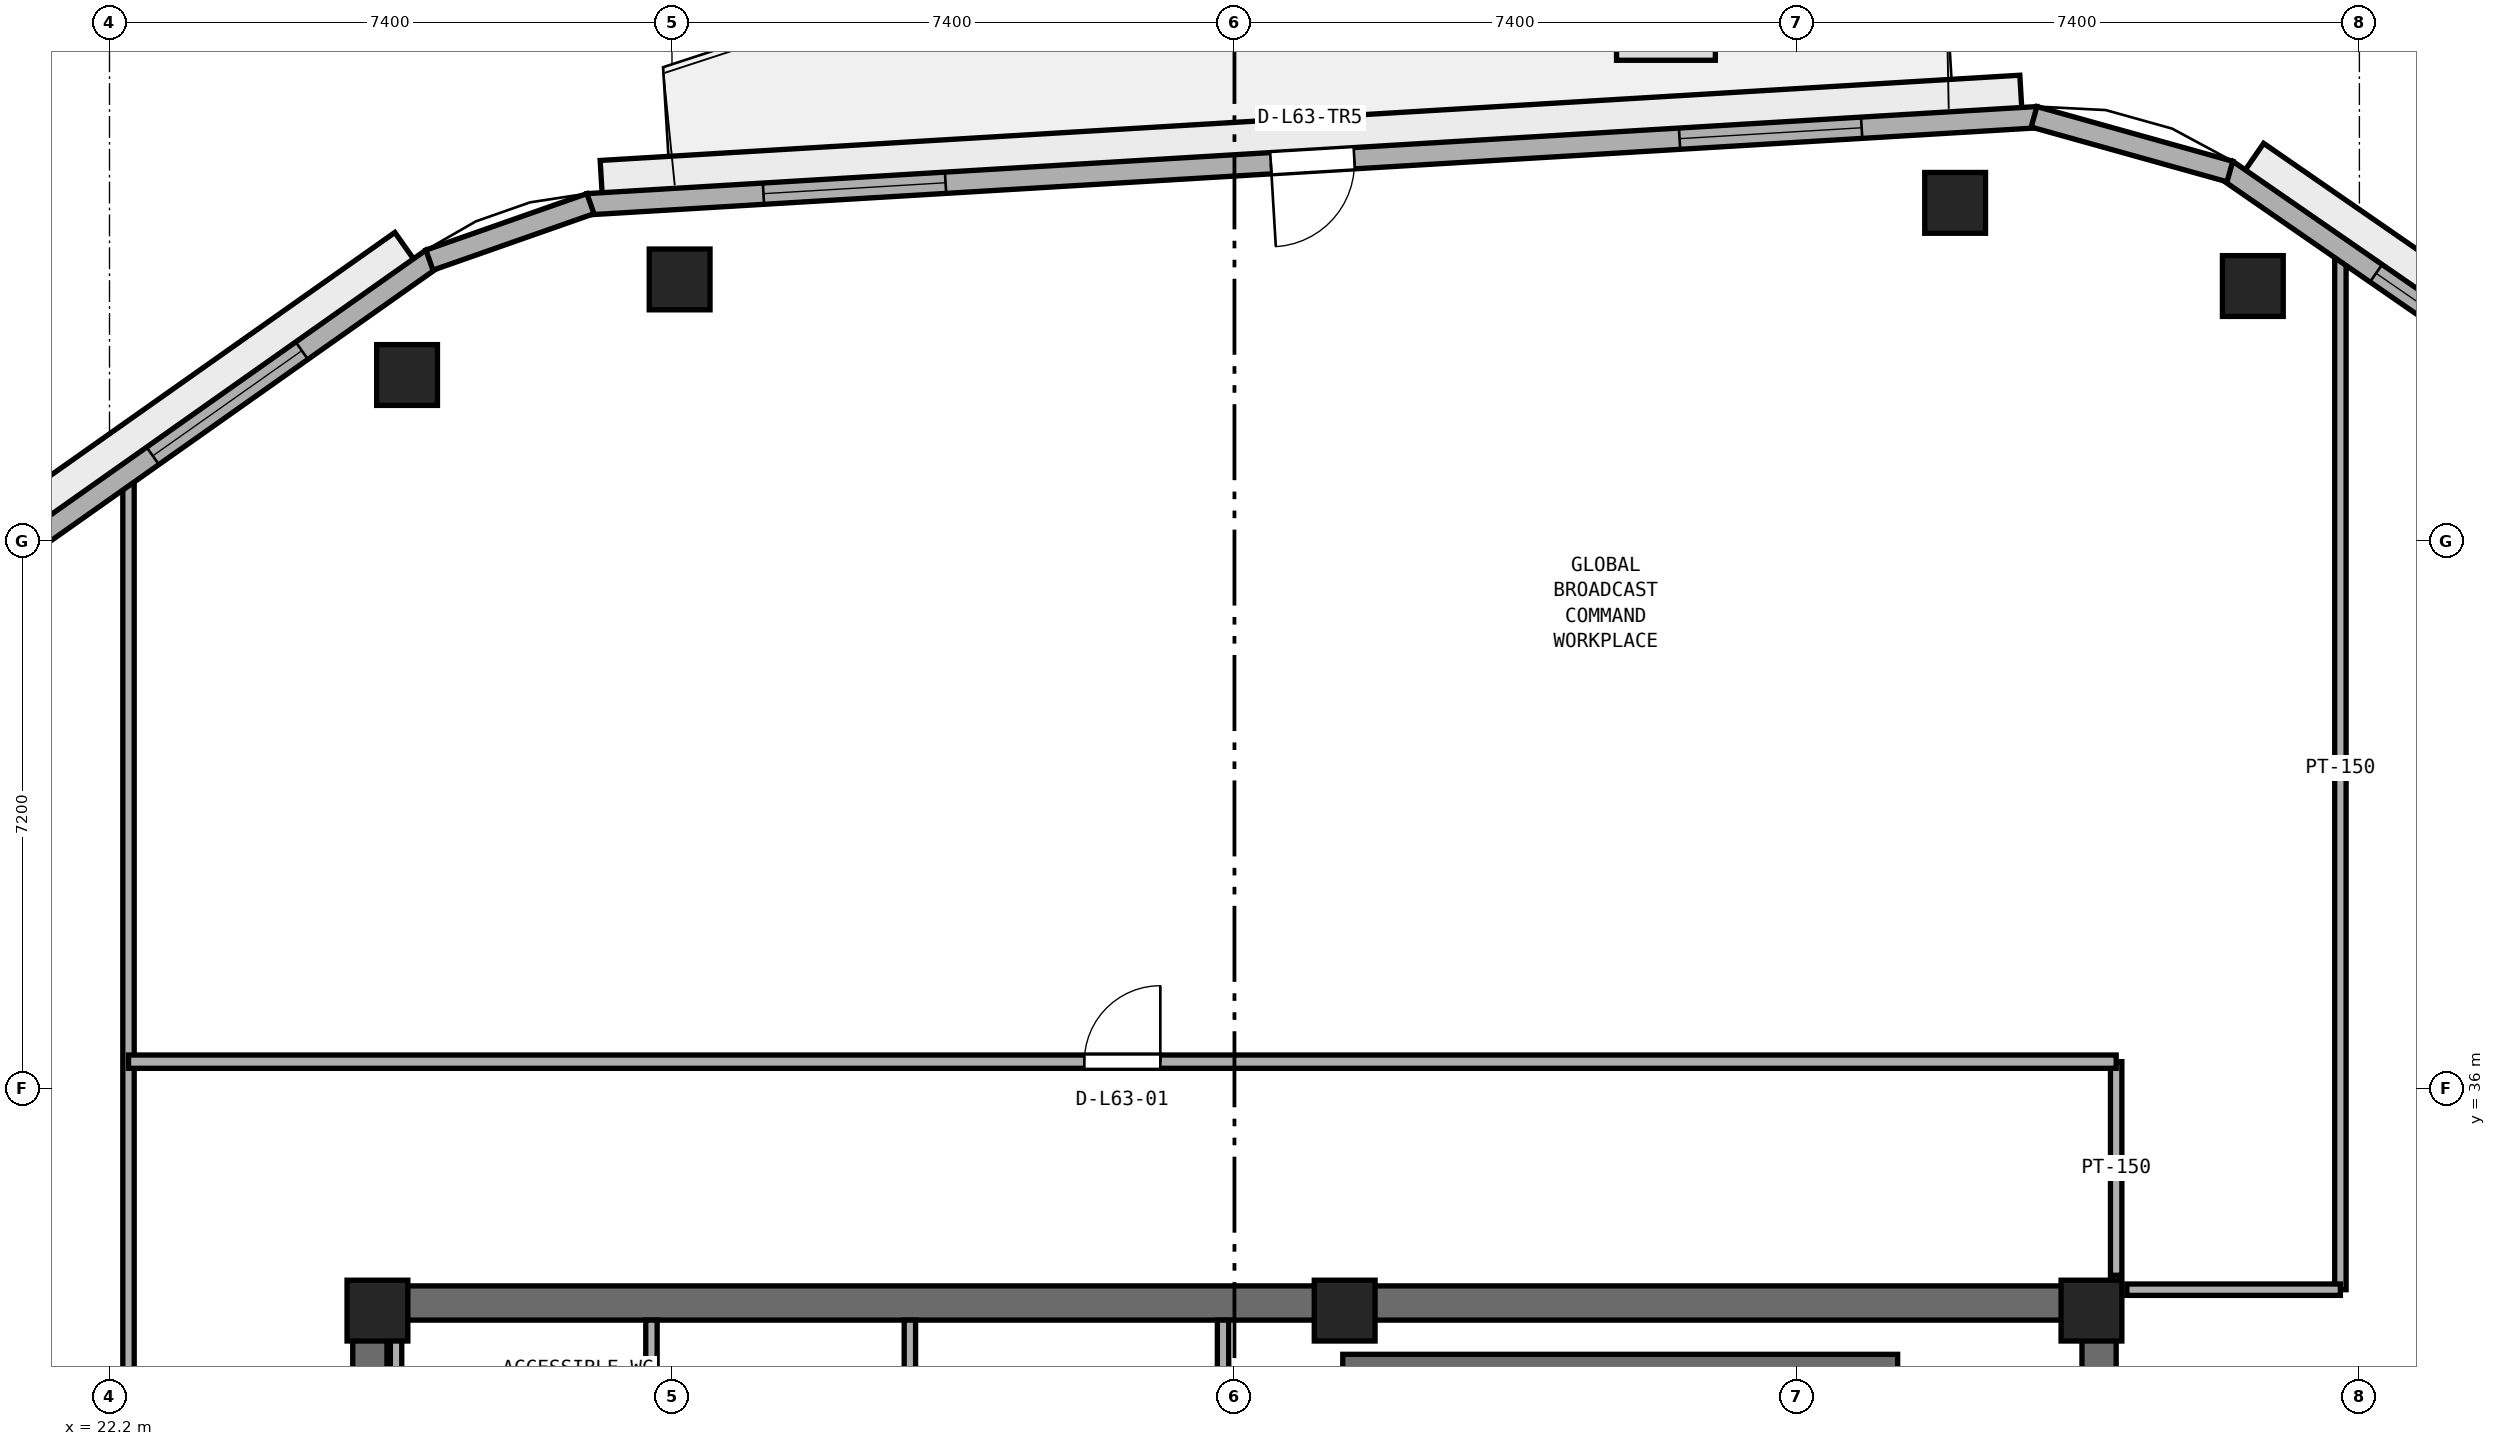
"""IFC4 building model, lengths in metres.
Left out: names, types, materials, properties, quantities, classifications, styles, units other than length and angle.
Written with IfcOpenShell. Run it as: python <this file> out.ifc"""

import sys

from ifc_helpers import new_model, si_unit, direction, frame, frame_2d, origin, origin_2d, place, context, subcontext, project, spatial, rectangle, extrude, element, fill, save


model = new_model("IFC4")
c1 = context("Model", 3, precision=1e-05, world=origin(), true_north=direction((0.0, 1.0)))
c2 = subcontext(c1, "Body", "Model", "MODEL_VIEW")
j1 = project(units=[si_unit("LENGTHUNIT", "METRE"), si_unit("PLANEANGLEUNIT", "RADIAN")], contexts=[c1])
p1 = place(None, origin())
s1 = spatial("IfcSite", under=j1, at=p1, CompositionType="ELEMENT")
p2 = place(p1, origin())
s2 = spatial("IfcBuilding", under=s1, at=p2, CompositionType="ELEMENT")
p3 = place(p2, frame((0.0, 0.0, 247.8)))
s3 = spatial("IfcBuildingStorey", under=s2, at=p3, CompositionType="ELEMENT", Elevation=247.8)
p4 = place(p3, frame((25.4, 33.175, 0.0), z_axis=(0.0, 0.0, 1.0), x_axis=(1.0, 0.0, 0.0)))
e1 = element("IfcWall", 1, at=p4, inside=s3, PredefinedType="SHEAR", context=c2, shape_type="SweptSolid", body=[
    extrude(rectangle(XDim=23.2, YDim=0.45, at=frame_2d((11.6, 0.0))), origin(), (0.0, 0.0, 1.0), 3.51),
])
p5 = place(p3, frame((25.625, 17.45, 0.0), z_axis=(0.0, 0.0, 1.0), x_axis=(0.0, 1.0, 0.0)))
e2 = element("IfcWall", 2, at=p5, inside=s3, PredefinedType="SHEAR", context=c2, shape_type="SweptSolid", body=[
    extrude(rectangle(XDim=15.5, YDim=0.45, at=frame_2d((7.75, 0.0))), origin(), (0.0, 0.0, 1.0), 3.51),
])
p6 = place(p5, frame((7.0, 0.0, 0.0)))
e3 = element("IfcOpeningElement", 3, at=p6, cuts=e2, PredefinedType="OPENING", context=c2, shape_type="SweptSolid", body=[
    extrude(rectangle(XDim=1.5, YDim=2.15, at=frame_2d((0.75, 1.075))), frame((0.0, 0.235, 0.0), z_axis=(0.0, -1.0, 0.0), x_axis=(1.0, 0.0, 0.0)), (0.0, 0.0, 1.0), 0.47),
])
p7 = place(p3, frame((48.375, 17.45, 0.0), z_axis=(0.0, 0.0, 1.0), x_axis=(0.0, 1.0, 0.0)))
e4 = element("IfcWall", 4, at=p7, inside=s3, PredefinedType="SHEAR", context=c2, shape_type="SweptSolid", body=[
    extrude(rectangle(XDim=15.5, YDim=0.45, at=frame_2d((7.75, 0.0))), origin(), (0.0, 0.0, 1.0), 3.51),
])
p8 = place(p7, frame((5.85, 0.0, 0.0)))
e5 = element("IfcOpeningElement", 5, at=p8, cuts=e4, PredefinedType="OPENING", context=c2, shape_type="SweptSolid", body=[
    extrude(rectangle(XDim=1.5, YDim=2.15, at=frame_2d((0.75, 1.075))), frame((0.0, 0.235, 0.0), z_axis=(0.0, -1.0, 0.0), x_axis=(1.0, 0.0, 0.0)), (0.0, 0.0, 1.0), 0.47),
])
for number, where, z_axis, x_axis in (
    (6, (48.275, 33.075, 0.0), (0.0, 0.0, 1.0), (1.0, 0.0, 0.0)),
    (7, (38.45, 33.075, 0.0), (0.0, 0.0, 1.0), (1.0, 0.0, 0.0)),
    (8, (25.725, 33.075, 0.0), (0.0, 0.0, 1.0), (1.0, 0.0, 0.0)),
):
    element("IfcColumn", number, at=place(p3, frame(where, z_axis=z_axis, x_axis=x_axis)), inside=s3, PredefinedType="PILASTER", context=c2, shape_type="SweptSolid", body=[
        extrude(rectangle(XDim=0.8, YDim=0.8, at=origin_2d()), origin(), (0.0, 0.0, 1.0), 3.8),
    ])
for number, where, z_axis, x_axis in (
    (9, (50.398, 46.554, 0.0), (0.0, 0.0, 1.0), (1.0, 0.0, 0.0)),
    (10, (46.481, 47.648, 0.0), (0.0, 0.0, 1.0), (1.0, 0.0, 0.0)),
    (11, (29.701, 46.641, 0.0), (0.0, 0.0, 1.0), (1.0, 0.0, 0.0)),
    (12, (26.115, 45.384, 0.0), (0.0, 0.0, 1.0), (1.0, 0.0, 0.0)),
):
    element("IfcColumn", number, at=place(p3, frame(where, z_axis=z_axis, x_axis=x_axis)), inside=s3, PredefinedType="COLUMN", context=c2, shape_type="SweptSolid", body=[
        extrude(rectangle(XDim=0.8, YDim=0.8, at=origin_2d()), origin(), (0.0, 0.0, 1.0), 3.8),
    ])
p9 = place(p3, frame((38.425, 32.375, 0.0), z_axis=(0.0, 0.0, 1.0), x_axis=(1.0, 0.0, 0.0)))
e13 = element("IfcWall", 13, at=p9, inside=s3, PredefinedType="SHEAR", context=c2, shape_type="SweptSolid", body=[
    extrude(rectangle(XDim=7.3, YDim=0.25, at=frame_2d((3.65, 0.0))), origin(), (0.0, 0.0, 1.0), 3.51),
])
p10 = place(p3, frame((25.97, 30.65, 0.0), z_axis=(0.0, 0.0, 1.0), x_axis=(0.0, 1.0, 0.0)))
e14 = element("IfcWall", 14, at=p10, inside=s3, PredefinedType="PARTITIONING", context=c2, shape_type="SweptSolid", body=[
    extrude(rectangle(XDim=2.3, YDim=0.15, at=frame_2d((1.15, 0.0))), origin(), (0.0, 0.0, 1.0), 2.61),
])
for number, where, z_axis, x_axis in (
    (15, (29.33, 30.65, 0.0), (0.0, 0.0, 1.0), (0.0, 1.0, 0.0)),
    (16, (32.73, 30.65, 0.0), (0.0, 0.0, 1.0), (0.0, 1.0, 0.0)),
    (17, (36.85, 30.65, 0.0), (0.0, 0.0, 1.0), (0.0, 1.0, 0.0)),
):
    element("IfcWall", number, at=place(p3, frame(where, z_axis=z_axis, x_axis=x_axis)), inside=s3, PredefinedType="PARTITIONING", context=c2, shape_type="SweptSolid", body=[
        extrude(rectangle(XDim=2.3, YDim=0.15, at=frame_2d((1.15, 0.0))), origin(), (0.0, 0.0, 1.0), 3.51),
    ])
p11 = place(p3, frame((51.55, 33.35, 0.0), z_axis=(0.0, 0.0, 1.0), x_axis=(0.0, 1.0, 0.0)))
e18 = element("IfcWall", 18, at=p11, inside=s3, PredefinedType="PARTITIONING", context=c2, shape_type="SweptSolid", body=[
    extrude(rectangle(XDim=13.727, YDim=0.15, at=frame_2d((6.863, 0.0))), origin(), (0.0, 0.0, 1.0), 3.51),
])
p12 = place(p3, frame((48.6, 33.54, 0.0), z_axis=(0.0, 0.0, 1.0), x_axis=(0.0, 1.0, 0.0)))
e19 = element("IfcWall", 19, at=p12, inside=s3, PredefinedType="PARTITIONING", context=c2, shape_type="SweptSolid", body=[
    extrude(rectangle(XDim=2.81, YDim=0.15, at=frame_2d((1.405, 0.0))), origin(), (0.0, 0.0, 1.0), 2.893),
])
p13 = place(p3, frame((22.45, 6.02, 0.0), z_axis=(0.0, 0.0, 1.0), x_axis=(0.0, 1.0, 0.0)))
e20 = element("IfcWall", 20, at=p13, inside=s3, PredefinedType="PARTITIONING", context=c2, shape_type="SweptSolid", body=[
    extrude(rectangle(XDim=38.106, YDim=0.15, at=frame_2d((19.053, 0.0))), origin(), (0.0, 0.0, 1.0), 3.51),
])
p14 = place(p13, frame((11.005, 0.0, 0.0)))
e21 = element("IfcOpeningElement", 21, at=p14, cuts=e20, PredefinedType="OPENING", context=c2, shape_type="SweptSolid", body=[
    extrude(rectangle(XDim=0.9, YDim=2.1, at=frame_2d((0.45, 1.05))), frame((0.0, 0.085, 0.0), z_axis=(0.0, -1.0, 0.0), x_axis=(1.0, 0.0, 0.0)), (0.0, 0.0, 1.0), 0.17),
])
p15 = place(p13, frame((22.155, 0.0, 0.0)))
e22 = element("IfcOpeningElement", 22, at=p15, cuts=e20, PredefinedType="OPENING", context=c2, shape_type="SweptSolid", body=[
    extrude(rectangle(XDim=0.9, YDim=2.1, at=frame_2d((0.45, 1.05))), frame((0.0, 0.085, 0.0), z_axis=(0.0, -1.0, 0.0), x_axis=(1.0, 0.0, 0.0)), (0.0, 0.0, 1.0), 0.17),
])
p16 = place(p3, frame((48.74, 33.35, 0.0), z_axis=(0.0, 0.0, 1.0), x_axis=(1.0, 0.0, 0.0)))
e23 = element("IfcWall", 23, at=p16, inside=s3, PredefinedType="PARTITIONING", context=c2, shape_type="SweptSolid", body=[
    extrude(rectangle(XDim=2.81, YDim=0.15, at=frame_2d((1.405, 0.0))), origin(), (0.0, 0.0, 1.0), 2.893),
])
p17 = place(p3, frame((22.45, 36.35, 0.0), z_axis=(0.0, 0.0, 1.0), x_axis=(1.0, 0.0, 0.0)))
e24 = element("IfcWall", 24, at=p17, inside=s3, PredefinedType="PARTITIONING", context=c2, shape_type="SweptSolid", body=[
    extrude(rectangle(XDim=26.15, YDim=0.175, at=frame_2d((13.075, 0.0))), origin(), (0.0, 0.0, 1.0), 3.51),
])
p18 = place(p17, frame((12.575, 0.0, 0.0)))
e25 = element("IfcOpeningElement", 25, at=p18, cuts=e24, PredefinedType="OPENING", context=c2, shape_type="SweptSolid", body=[
    extrude(rectangle(XDim=1.0, YDim=2.12, at=frame_2d((0.5, 1.06))), frame((0.0, 0.097, 0.0), z_axis=(0.0, -1.0, 0.0), x_axis=(1.0, 0.0, 0.0)), (0.0, 0.0, 1.0), 0.195),
])
p19 = place(p3, frame((63.651, 38.683, 0.0), z_axis=(0.0, 0.0, 1.0), x_axis=(-0.822655095, 0.568540759022, 0.0)))
e26 = element("IfcWall", 26, at=p19, inside=s3, PredefinedType="STANDARD", context=c2, shape_type="SweptSolid", body=[
    extrude(rectangle(XDim=16.528, YDim=0.28, at=frame_2d((8.264, 0.0))), origin(), (0.0, 0.0, 1.0), 3.51),
])
p20 = place(p19, frame((1.888, 0.0, 0.9)))
e27 = element("IfcOpeningElement", 27, at=p20, cuts=e26, PredefinedType="OPENING", context=c2, shape_type="SweptSolid", body=[
    extrude(rectangle(XDim=2.4, YDim=1.75, at=frame_2d((1.2, 0.875))), frame((0.0, 0.15, 0.0), z_axis=(0.0, -1.0, 0.0), x_axis=(1.0, 0.0, 0.0)), (0.0, 0.0, 1.0), 0.3),
])
p21 = place(p19, frame((7.064, 0.0, 0.9)))
e28 = element("IfcOpeningElement", 28, at=p21, cuts=e26, PredefinedType="OPENING", context=c2, shape_type="SweptSolid", body=[
    extrude(rectangle(XDim=2.4, YDim=1.75, at=frame_2d((1.2, 0.875))), frame((0.0, 0.15, 0.0), z_axis=(0.0, -1.0, 0.0), x_axis=(1.0, 0.0, 0.0)), (0.0, 0.0, 1.0), 0.3),
])
p22 = place(p19, frame((11.74, 0.0, 0.9)))
e29 = element("IfcOpeningElement", 29, at=p22, cuts=e26, PredefinedType="OPENING", context=c2, shape_type="SweptSolid", body=[
    extrude(rectangle(XDim=2.4, YDim=1.75, at=frame_2d((1.2, 0.875))), frame((0.0, 0.15, 0.0), z_axis=(0.0, -1.0, 0.0), x_axis=(1.0, 0.0, 0.0)), (0.0, 0.0, 1.0), 0.3),
])
p23 = place(p3, frame((47.566, 48.775, 0.0), z_axis=(0.0, 0.0, 1.0), x_axis=(-0.998202767485, -0.059926913695, 0.0)))
e30 = element("IfcWall", 30, at=p23, inside=s3, PredefinedType="STANDARD", context=c2, shape_type="SweptSolid", body=[
    extrude(rectangle(XDim=19.111, YDim=0.28, at=frame_2d((9.556, 0.0))), origin(), (0.0, 0.0, 1.0), 3.51),
])
p24 = place(p23, frame((9.005, 0.0, 0.0)))
e31 = element("IfcOpeningElement", 31, at=p24, cuts=e30, PredefinedType="OPENING", context=c2, shape_type="SweptSolid", body=[
    extrude(rectangle(XDim=1.1, YDim=2.2, at=frame_2d((0.55, 1.1))), frame((0.0, 0.15, 0.0), z_axis=(0.0, -1.0, 0.0), x_axis=(1.0, 0.0, 0.0)), (0.0, 0.0, 1.0), 0.3),
])
p25 = place(p23, frame((2.319, 0.0, 0.9)))
e32 = element("IfcOpeningElement", 32, at=p25, cuts=e30, PredefinedType="OPENING", context=c2, shape_type="SweptSolid", body=[
    extrude(rectangle(XDim=2.4, YDim=1.75, at=frame_2d((1.2, 0.875))), frame((0.0, 0.15, 0.0), z_axis=(0.0, -1.0, 0.0), x_axis=(1.0, 0.0, 0.0)), (0.0, 0.0, 1.0), 0.3),
])
p26 = place(p23, frame((14.392, 0.0, 0.9)))
e33 = element("IfcOpeningElement", 33, at=p26, cuts=e30, PredefinedType="OPENING", context=c2, shape_type="SweptSolid", body=[
    extrude(rectangle(XDim=2.4, YDim=1.75, at=frame_2d((1.2, 0.875))), frame((0.0, 0.15, 0.0), z_axis=(0.0, -1.0, 0.0), x_axis=(1.0, 0.0, 0.0)), (0.0, 0.0, 1.0), 0.3),
])
p27 = place(p3, frame((26.443, 46.913, 0.0), z_axis=(0.0, 0.0, 1.0), x_axis=(-0.817024179766, -0.576603407619, 0.0)))
e34 = element("IfcWall", 34, at=p27, inside=s3, PredefinedType="STANDARD", context=c2, shape_type="SweptSolid", body=[
    extrude(rectangle(XDim=17.78, YDim=0.28, at=frame_2d((8.89, 0.0))), origin(), (0.0, 0.0, 1.0), 3.51),
])
p28 = place(p27, frame((2.097, 0.0, 0.9)))
e35 = element("IfcOpeningElement", 35, at=p28, cuts=e34, PredefinedType="OPENING", context=c2, shape_type="SweptSolid", body=[
    extrude(rectangle(XDim=2.4, YDim=1.75, at=frame_2d((1.2, 0.875))), frame((0.0, 0.15, 0.0), z_axis=(0.0, -1.0, 0.0), x_axis=(1.0, 0.0, 0.0)), (0.0, 0.0, 1.0), 0.3),
])
p29 = place(p27, frame((7.69, 0.0, 0.9)))
e36 = element("IfcOpeningElement", 36, at=p29, cuts=e34, PredefinedType="OPENING", context=c2, shape_type="SweptSolid", body=[
    extrude(rectangle(XDim=2.4, YDim=1.75, at=frame_2d((1.2, 0.875))), frame((0.0, 0.15, 0.0), z_axis=(0.0, -1.0, 0.0), x_axis=(1.0, 0.0, 0.0)), (0.0, 0.0, 1.0), 0.3),
])
p30 = place(p27, frame((13.283, 0.0, 0.9)))
e37 = element("IfcOpeningElement", 37, at=p30, cuts=e34, PredefinedType="OPENING", context=c2, shape_type="SweptSolid", body=[
    extrude(rectangle(XDim=2.4, YDim=1.75, at=frame_2d((1.2, 0.875))), frame((0.0, 0.15, 0.0), z_axis=(0.0, -1.0, 0.0), x_axis=(1.0, 0.0, 0.0)), (0.0, 0.0, 1.0), 0.3),
])
p31 = place(p3, frame((50.096, 48.061, 0.0), z_axis=(0.0, 0.0, 1.0), x_axis=(-0.963108887091, 0.269112005688, 0.0)))
e38 = element("IfcWall", 38, at=p31, inside=s3, PredefinedType="STANDARD", context=c2, shape_type="SweptSolid", body=[
    extrude(rectangle(XDim=2.675, YDim=0.28, at=frame_2d((1.338, 0.0))), origin(), (0.0, 0.0, 1.0), 3.51),
])
p32 = place(p3, frame((28.527, 47.638, 0.0), z_axis=(0.0, 0.0, 1.0), x_axis=(-0.943686979207, -0.330839667022, 0.0)))
e39 = element("IfcWall", 39, at=p32, inside=s3, PredefinedType="STANDARD", context=c2, shape_type="SweptSolid", body=[
    extrude(rectangle(XDim=2.245, YDim=0.28, at=frame_2d((1.123, 0.0))), origin(), (0.0, 0.0, 1.0), 3.51),
])
p33 = place(p18, origin())
e40 = element("IfcDoor", 40, at=p33, inside=s3, OperationType="SINGLE_SWING_RIGHT", PredefinedType="DOOR", context=c2, shape_type="SweptSolid", body=[
    extrude(rectangle(XDim=1.0, YDim=2.12, at=frame_2d((0.5, 1.06))), frame((0.0, 0.025, 0.0), z_axis=(0.0, -1.0, 0.0), x_axis=(1.0, 0.0, 0.0)), (0.0, 0.0, 1.0), 0.05),
])
fill(e25, e40)
p34 = place(p22, origin())
e41 = element("IfcWindow", 41, at=p34, inside=s3, PartitioningType="SINGLE_PANEL", PredefinedType="WINDOW", context=c2, shape_type="SweptSolid", body=[
    extrude(rectangle(XDim=2.4, YDim=1.75, at=frame_2d((1.2, 0.875))), frame((0.0, 0.03, 0.0), z_axis=(0.0, -1.0, 0.0), x_axis=(1.0, 0.0, 0.0)), (0.0, 0.0, 1.0), 0.06),
])
fill(e29, e41)
p35 = place(p24, origin())
e42 = element("IfcDoor", 42, at=p35, inside=s3, OperationType="SINGLE_SWING_RIGHT", PredefinedType="DOOR", context=c2, shape_type="SweptSolid", body=[
    extrude(rectangle(XDim=1.1, YDim=2.2, at=frame_2d((0.55, 1.1))), frame((0.0, 0.025, 0.0), z_axis=(0.0, -1.0, 0.0), x_axis=(1.0, 0.0, 0.0)), (0.0, 0.0, 1.0), 0.05),
])
fill(e31, e42)
p36 = place(p25, origin())
e43 = element("IfcWindow", 43, at=p36, inside=s3, PartitioningType="SINGLE_PANEL", PredefinedType="WINDOW", context=c2, shape_type="SweptSolid", body=[
    extrude(rectangle(XDim=2.4, YDim=1.75, at=frame_2d((1.2, 0.875))), frame((0.0, 0.03, 0.0), z_axis=(0.0, -1.0, 0.0), x_axis=(1.0, 0.0, 0.0)), (0.0, 0.0, 1.0), 0.06),
])
fill(e32, e43)
p37 = place(p26, origin())
e44 = element("IfcWindow", 44, at=p37, inside=s3, PartitioningType="SINGLE_PANEL", PredefinedType="WINDOW", context=c2, shape_type="SweptSolid", body=[
    extrude(rectangle(XDim=2.4, YDim=1.75, at=frame_2d((1.2, 0.875))), frame((0.0, 0.03, 0.0), z_axis=(0.0, -1.0, 0.0), x_axis=(1.0, 0.0, 0.0)), (0.0, 0.0, 1.0), 0.06),
])
fill(e33, e44)
p38 = place(p28, origin())
e45 = element("IfcWindow", 45, at=p38, inside=s3, PartitioningType="SINGLE_PANEL", PredefinedType="WINDOW", context=c2, shape_type="SweptSolid", body=[
    extrude(rectangle(XDim=2.4, YDim=1.75, at=frame_2d((1.2, 0.875))), frame((0.0, 0.03, 0.0), z_axis=(0.0, -1.0, 0.0), x_axis=(1.0, 0.0, 0.0)), (0.0, 0.0, 1.0), 0.06),
])
fill(e35, e45)
save(model, sys.argv[1])
